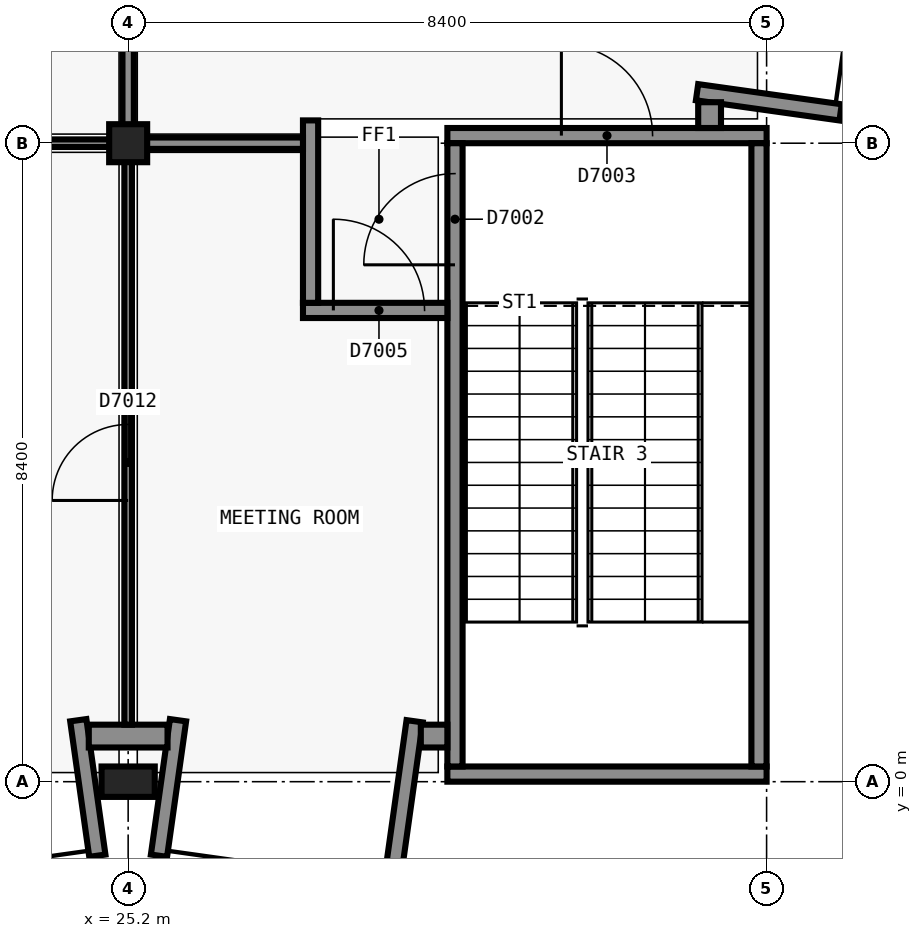
"""IFC4 building model, lengths in metres.
Left out: names, types, materials, properties, quantities, classifications, styles, units other than length and angle.
Written with IfcOpenShell. Run it as: python <this file> out.ifc"""

import sys

from ifc_helpers import new_model, si_unit, direction, frame, frame_2d, origin, origin_2d, place, context, subcontext, project, spatial, rectangle, extrude, element, fill, save


model = new_model("IFC4")
c1 = context("Model", 3, precision=1e-05, world=origin(), true_north=direction((0.0, 1.0)))
c2 = subcontext(c1, "Body", "Model", "MODEL_VIEW")
j1 = project(units=[si_unit("LENGTHUNIT", "METRE"), si_unit("PLANEANGLEUNIT", "RADIAN")], contexts=[c1])
p1 = place(None, origin())
s1 = spatial("IfcSite", under=j1, at=p1, CompositionType="ELEMENT")
p2 = place(p1, origin())
s2 = spatial("IfcBuilding", under=s1, at=p2, CompositionType="ELEMENT")
p3 = place(p2, frame((0.0, 0.0, 33.6)))
s3 = spatial("IfcBuildingStorey", under=s2, at=p3, CompositionType="ELEMENT", Elevation=33.6)
p4 = place(p3, frame((33.6, 0.1, 0.0), z_axis=(0.0, 0.0, 1.0), x_axis=(-1.0, 0.0, 0.0)))
e1 = element("IfcWall", 1, at=p4, inside=s3, PredefinedType="SHEAR", context=c2, shape_type="SweptSolid", body=[
    extrude(rectangle(XDim=4.2, YDim=0.2, at=frame_2d((2.1, 0.0))), origin(), (0.0, 0.0, 1.0), 4.5),
])
p5 = place(p3, frame((29.4, 8.5, 0.0), z_axis=(0.0, 0.0, 1.0), x_axis=(1.0, 0.0, 0.0)))
e2 = element("IfcWall", 2, at=p5, inside=s3, PredefinedType="SHEAR", context=c2, shape_type="SweptSolid", body=[
    extrude(rectangle(XDim=4.2, YDim=0.2, at=frame_2d((2.1, 0.0))), origin(), (0.0, 0.0, 1.0), 4.5),
])
p6 = place(p5, frame((1.5, 0.0, 0.0)))
e3 = element("IfcOpeningElement", 3, at=p6, cuts=e2, PredefinedType="OPENING", context=c2, shape_type="SweptSolid", body=[
    extrude(rectangle(XDim=1.2, YDim=2.1, at=frame_2d((0.6, 1.05))), frame((0.0, 0.11, 0.0), z_axis=(0.0, -1.0, 0.0), x_axis=(1.0, 0.0, 0.0)), (0.0, 0.0, 1.0), 0.22),
])
p7 = place(p3, frame((29.5, 0.2, 0.0), z_axis=(0.0, 0.0, 1.0), x_axis=(0.0, 1.0, 0.0)))
e4 = element("IfcWall", 4, at=p7, inside=s3, PredefinedType="SHEAR", context=c2, shape_type="SweptSolid", body=[
    extrude(rectangle(XDim=8.2, YDim=0.2, at=frame_2d((4.1, 0.0))), origin(), (0.0, 0.0, 1.0), 4.5),
])
p8 = place(p7, frame((6.6, 0.0, 0.0)))
e5 = element("IfcOpeningElement", 5, at=p8, cuts=e4, PredefinedType="OPENING", context=c2, shape_type="SweptSolid", body=[
    extrude(rectangle(XDim=1.2, YDim=2.1, at=frame_2d((0.6, 1.05))), frame((0.0, 0.11, 0.0), z_axis=(0.0, -1.0, 0.0), x_axis=(1.0, 0.0, 0.0)), (0.0, 0.0, 1.0), 0.22),
])
p9 = place(p3, frame((33.5, 8.4, 0.0), z_axis=(0.0, 0.0, 1.0), x_axis=(0.0, -1.0, 0.0)))
e6 = element("IfcWall", 6, at=p9, inside=s3, PredefinedType="SHEAR", context=c2, shape_type="SweptSolid", body=[
    extrude(rectangle(XDim=8.2, YDim=0.2, at=frame_2d((4.1, 0.0))), origin(), (0.0, 0.0, 1.0), 4.5),
])
p10 = place(p3, frame((25.2, 0.0, 0.0), z_axis=(0.0, 0.0, 1.0), x_axis=(1.0, 0.0, 0.0)))
e7 = element("IfcColumn", 7, at=p10, inside=s3, PredefinedType="COLUMN", context=c2, shape_type="SweptSolid", body=[
    extrude(rectangle(XDim=0.7, YDim=0.4, at=origin_2d()), origin(), (0.0, 0.0, 1.0), 4.5),
])
p11 = place(p3, frame((25.2, 8.4, 0.0), z_axis=(0.0, 0.0, 1.0), x_axis=(1.0, 0.0, 0.0)))
e8 = element("IfcColumn", 8, at=p11, inside=s3, PredefinedType="COLUMN", context=c2, shape_type="SweptSolid", body=[
    extrude(rectangle(XDim=0.5, YDim=0.5, at=origin_2d()), origin(), (0.0, 0.0, 1.0), 4.5),
])
p12 = place(p3, frame((32.685, 9.071, 0.0), z_axis=(0.0, 0.0, 1.0), x_axis=(0.990269539441, -0.139162635989, 0.0)))
e9 = element("IfcWall", 9, at=p12, inside=s3, PredefinedType="SOLIDWALL", context=c2, shape_type="SweptSolid", body=[
    extrude(rectangle(XDim=1.907, YDim=0.215, at=frame_2d((0.954, 0.0))), origin(), (0.0, 0.0, 1.0), 4.2),
])
p13 = place(p3, frame((32.85, 8.939, 0.0), z_axis=(0.0, 0.0, 1.0), x_axis=(0.0, -1.0, 0.0)))
e10 = element("IfcWall", 10, at=p13, inside=s3, PredefinedType="SOLIDWALL", context=c2, shape_type="SweptSolid", body=[
    extrude(rectangle(XDim=0.339, YDim=0.3, at=frame_2d((0.169, 0.0))), origin(), (0.0, 0.0, 1.0), 4.2),
])
for number, where, z_axis, x_axis in (
    (11, (24.544, 0.809, 0.0), (0.0, 0.0, 1.0), (0.139, -0.99, 0.0)),
    (12, (25.856, 0.809, 0.0), (0.0, 0.0, 1.0), (-0.139, -0.99, 0.0)),
):
    element("IfcWall", number, at=place(p3, frame(where, z_axis=z_axis, x_axis=x_axis)), inside=s3, PredefinedType="SOLIDWALL", context=c2, shape_type="SweptSolid", body=[
        extrude(rectangle(XDim=1.8, YDim=0.215, at=frame_2d((0.9, 0.0))), origin(), (0.0, 0.0, 1.0), 4.2),
    ])
p14 = place(p3, frame((28.969, 0.795, 0.0), z_axis=(0.0, 0.0, 1.0), x_axis=(-0.139249775508, -0.99025728981, 0.0)))
e13 = element("IfcWall", 13, at=p14, inside=s3, PredefinedType="SOLIDWALL", context=c2, shape_type="SweptSolid", body=[
    extrude(rectangle(XDim=2.22, YDim=0.215, at=frame_2d((1.11, 0.0))), origin(), (0.0, 0.0, 1.0), 4.2),
])
p15 = place(p3, frame((25.718, 0.6, 0.0), z_axis=(0.0, 0.0, 1.0), x_axis=(-1.0, 0.0, 0.0)))
e14 = element("IfcWall", 14, at=p15, inside=s3, PredefinedType="SOLIDWALL", context=c2, shape_type="SweptSolid", body=[
    extrude(rectangle(XDim=1.036, YDim=0.3, at=frame_2d((0.518, 0.0))), origin(), (0.0, 0.0, 1.0), 4.2),
])
p16 = place(p3, frame((29.4, 0.6, 0.0), z_axis=(0.0, 0.0, 1.0), x_axis=(-1.0, 0.0, 0.0)))
e15 = element("IfcWall", 15, at=p16, inside=s3, PredefinedType="SOLIDWALL", context=c2, shape_type="SweptSolid", body=[
    extrude(rectangle(XDim=0.349, YDim=0.3, at=frame_2d((0.175, 0.0))), origin(), (0.0, 0.0, 1.0), 4.2),
])
p17 = place(p3, frame((27.5, 6.2, 0.0), z_axis=(0.0, 0.0, 1.0), x_axis=(1.0, 0.0, 0.0)))
e16 = element("IfcWall", 16, at=p17, inside=s3, PredefinedType="SOLIDWALL", context=c2, shape_type="SweptSolid", body=[
    extrude(rectangle(XDim=1.9, YDim=0.2, at=frame_2d((0.95, 0.0))), origin(), (0.0, 0.0, 1.0), 4.2),
])
p18 = place(p17, frame((0.4, 0.0, 0.0)))
e17 = element("IfcOpeningElement", 17, at=p18, cuts=e16, PredefinedType="OPENING", context=c2, shape_type="SweptSolid", body=[
    extrude(rectangle(XDim=1.2, YDim=2.1, at=frame_2d((0.6, 1.05))), frame((0.0, 0.11, 0.0), z_axis=(0.0, -1.0, 0.0), x_axis=(1.0, 0.0, 0.0)), (0.0, 0.0, 1.0), 0.22),
])
p19 = place(p3, frame((27.6, 6.3, 0.0), z_axis=(0.0, 0.0, 1.0), x_axis=(0.0, 1.0, 0.0)))
e18 = element("IfcWall", 18, at=p19, inside=s3, PredefinedType="SOLIDWALL", context=c2, shape_type="SweptSolid", body=[
    extrude(rectangle(XDim=2.4, YDim=0.2, at=frame_2d((1.2, 0.0))), origin(), (0.0, 0.0, 1.0), 3.7),
])
p20 = place(p3, frame((25.125, 8.4, 0.0), z_axis=(0.0, 0.0, 1.0), x_axis=(1.0, 0.0, 0.0)))
e19 = element("IfcWall", 19, at=p20, inside=s3, PredefinedType="PARTITIONING", context=c2, shape_type="SweptSolid", body=[
    extrude(rectangle(XDim=2.375, YDim=0.15, at=frame_2d((1.188, 0.0))), origin(), (0.0, 0.0, 1.0), 3.5),
])
p21 = place(p3, frame((25.2, 8.475, 0.0), z_axis=(0.0, 0.0, 1.0), x_axis=(0.0, 1.0, 0.0)))
e20 = element("IfcWall", 20, at=p21, inside=s3, PredefinedType="PARTITIONING", context=c2, shape_type="SweptSolid", body=[
    extrude(rectangle(XDim=4.2, YDim=0.15, at=frame_2d((2.1, 0.0))), origin(), (0.0, 0.0, 1.0), 3.5),
])
p22 = place(p21, frame((1.525, 0.0, 0.0)))
e21 = element("IfcOpeningElement", 21, at=p22, cuts=e20, PredefinedType="OPENING", context=c2, shape_type="SweptSolid", body=[
    extrude(rectangle(XDim=1.0, YDim=2.1, at=frame_2d((0.5, 1.05))), frame((0.0, 0.085, 0.0), z_axis=(0.0, -1.0, 0.0), x_axis=(1.0, 0.0, 0.0)), (0.0, 0.0, 1.0), 0.17),
])
p23 = place(p3, frame((8.462, 8.4, 0.0), z_axis=(0.0, 0.0, 1.0), x_axis=(1.0, 0.0, 0.0)))
e22 = element("IfcWall", 22, at=p23, inside=s3, PredefinedType="PARTITIONING", context=c2, shape_type="SweptSolid", body=[
    extrude(rectangle(XDim=16.663, YDim=0.1, at=frame_2d((8.331, 0.0))), origin(), (0.0, 0.0, 1.0), 3.5),
])
p24 = place(p23, frame((3.637, 0.0, 0.0)))
e23 = element("IfcOpeningElement", 23, at=p24, cuts=e22, PredefinedType="OPENING", context=c2, shape_type="SweptSolid", body=[
    extrude(rectangle(XDim=1.0, YDim=2.1, at=frame_2d((0.5, 1.05))), frame((0.0, 0.06, 0.0), z_axis=(0.0, -1.0, 0.0), x_axis=(1.0, 0.0, 0.0)), (0.0, 0.0, 1.0), 0.12),
])
p25 = place(p3, frame((25.2, 0.75, 0.0), z_axis=(0.0, 0.0, 1.0), x_axis=(0.0, 1.0, 0.0)))
e24 = element("IfcWall", 24, at=p25, inside=s3, PredefinedType="PARTITIONING", context=c2, shape_type="SweptSolid", body=[
    extrude(rectangle(XDim=7.575, YDim=0.1, at=frame_2d((3.788, 0.0))), origin(), (0.0, 0.0, 1.0), 3.5),
])
p26 = place(p25, frame((2.95, 0.0, 0.0)))
e25 = element("IfcOpeningElement", 25, at=p26, cuts=e24, PredefinedType="OPENING", context=c2, shape_type="SweptSolid", body=[
    extrude(rectangle(XDim=1.0, YDim=2.1, at=frame_2d((0.5, 1.05))), frame((0.0, 0.06, 0.0), z_axis=(0.0, -1.0, 0.0), x_axis=(1.0, 0.0, 0.0)), (0.0, 0.0, 1.0), 0.12),
])
p27 = place(p8, origin())
e26 = element("IfcDoor", 26, at=p27, inside=s3, OperationType="SINGLE_SWING_RIGHT", PredefinedType="DOOR", context=c2, shape_type="SweptSolid", body=[
    extrude(rectangle(XDim=1.2, YDim=2.1, at=frame_2d((0.6, 1.05))), frame((0.0, 0.025, 0.0), z_axis=(0.0, -1.0, 0.0), x_axis=(1.0, 0.0, 0.0)), (0.0, 0.0, 1.0), 0.05),
])
fill(e5, e26)
p28 = place(p6, origin())
e27 = element("IfcDoor", 27, at=p28, inside=s3, OperationType="SINGLE_SWING_RIGHT", PredefinedType="DOOR", context=c2, shape_type="SweptSolid", body=[
    extrude(rectangle(XDim=1.2, YDim=2.1, at=frame_2d((0.6, 1.05))), frame((0.0, 0.025, 0.0), z_axis=(0.0, -1.0, 0.0), x_axis=(1.0, 0.0, 0.0)), (0.0, 0.0, 1.0), 0.05),
])
fill(e3, e27)
p29 = place(p18, origin())
e28 = element("IfcDoor", 28, at=p29, inside=s3, OperationType="SINGLE_SWING_RIGHT", PredefinedType="DOOR", context=c2, shape_type="SweptSolid", body=[
    extrude(rectangle(XDim=1.2, YDim=2.1, at=frame_2d((0.6, 1.05))), frame((0.0, 0.025, 0.0), z_axis=(0.0, -1.0, 0.0), x_axis=(1.0, 0.0, 0.0)), (0.0, 0.0, 1.0), 0.05),
])
fill(e17, e28)
p30 = place(p26, origin())
e29 = element("IfcDoor", 29, at=p30, inside=s3, OperationType="SINGLE_SWING_RIGHT", PredefinedType="DOOR", context=c2, shape_type="SweptSolid", body=[
    extrude(rectangle(XDim=1.0, YDim=2.1, at=frame_2d((0.5, 1.05))), frame((0.0, 0.025, 0.0), z_axis=(0.0, -1.0, 0.0), x_axis=(1.0, 0.0, 0.0)), (0.0, 0.0, 1.0), 0.05),
])
fill(e25, e29)
save(model, sys.argv[1])
